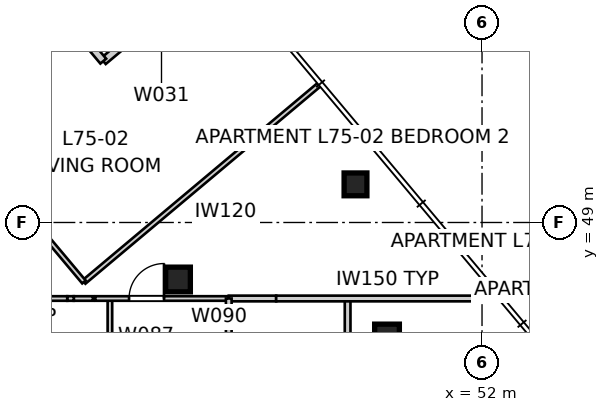
"""IFC4 building model, lengths in metres.
Left out: names, types, materials, properties, quantities, classifications, styles, units other than length and angle.
Written with IfcOpenShell. Run it as: python <this file> out.ifc"""

import sys

from ifc_helpers import new_model, si_unit, direction, frame, frame_2d, origin, origin_2d, place, context, subcontext, project, spatial, rectangle, extrude, element, fill, save


model = new_model("IFC4")
c1 = context("Model", 3, precision=1e-05, world=origin(), true_north=direction((0.0, 1.0)))
c2 = subcontext(c1, "Body", "Model", "MODEL_VIEW")
j1 = project(units=[si_unit("LENGTHUNIT", "METRE"), si_unit("PLANEANGLEUNIT", "RADIAN")], contexts=[c1])
p1 = place(None, origin())
s1 = spatial("IfcSite", under=j1, at=p1, CompositionType="ELEMENT")
p2 = place(p1, origin())
s2 = spatial("IfcBuilding", under=s1, at=p2, CompositionType="ELEMENT")
p3 = place(p2, frame((0.0, 0.0, 272.6)))
s3 = spatial("IfcBuildingStorey", under=s2, at=p3, CompositionType="ELEMENT", Elevation=272.6)
p4 = place(p3, frame((48.671, 50.003, -0.15), z_axis=(0.0, 0.0, 1.0), x_axis=(1.0, 0.0, 0.0)))
e1 = element("IfcColumn", 1, at=p4, inside=s3, PredefinedType="COLUMN", context=c2, shape_type="SweptSolid", body=[
    extrude(rectangle(XDim=0.6, YDim=0.6, at=origin_2d()), origin(), (0.0, 0.0, 1.0), 3.55),
])
for number, where, z_axis, x_axis in (
    (2, (49.5, 46.0, 0.0), (0.0, 0.0, 1.0), (1.0, 0.0, 0.0)),
    (3, (44.0, 47.5, 0.0), (0.0, 0.0, 1.0), (1.0, 0.0, 0.0)),
):
    element("IfcColumn", number, at=place(p3, frame(where, z_axis=z_axis, x_axis=x_axis)), inside=s3, PredefinedType="COLUMN", context=c2, shape_type="SweptSolid", body=[
        extrude(rectangle(XDim=0.65, YDim=0.65, at=origin_2d()), origin(), (0.0, 0.0, 1.0), 3.4),
    ])
p5 = place(p3, frame((45.098, 55.817, 0.0), z_axis=(0.0, 0.0, 1.0), x_axis=(-0.766060656284, -0.642768287094, 0.0)))
e4 = element("IfcWall", 4, at=p5, inside=s3, PredefinedType="SOLIDWALL", context=c2, shape_type="SweptSolid", body=[
    extrude(rectangle(XDim=4.0, YDim=0.2, at=frame_2d((2.0, 0.0))), origin(), (0.0, 0.0, 1.0), 3.25),
])
p6 = place(p5, frame((0.8, 0.0, 0.0)))
e5 = element("IfcOpeningElement", 5, at=p6, cuts=e4, PredefinedType="OPENING", context=c2, shape_type="SweptSolid", body=[
    extrude(rectangle(XDim=2.4, YDim=2.1, at=frame_2d((1.2, 1.05))), frame((0.0, 0.11, 0.0), z_axis=(0.0, -1.0, 0.0), x_axis=(1.0, 0.0, 0.0)), (0.0, 0.0, 1.0), 0.22),
])
p7 = place(p3, frame((42.034, 53.246, 0.0), z_axis=(0.0, 0.0, 1.0), x_axis=(-0.642798342015, 0.766035437498, 0.0)))
e6 = element("IfcWall", 6, at=p7, inside=s3, PredefinedType="SOLIDWALL", context=c2, shape_type="SweptSolid", body=[
    extrude(rectangle(XDim=4.0, YDim=0.2, at=frame_2d((2.0, 0.0))), origin(), (0.0, 0.0, 1.0), 3.25),
])
p8 = place(p7, frame((1.0, 0.0, 0.45)))
e7 = element("IfcOpeningElement", 7, at=p8, cuts=e6, PredefinedType="OPENING", context=c2, shape_type="SweptSolid", body=[
    extrude(rectangle(XDim=2.0, YDim=1.8, at=frame_2d((1.0, 0.9))), frame((0.0, 0.11, 0.0), z_axis=(0.0, -1.0, 0.0), x_axis=(1.0, 0.0, 0.0)), (0.0, 0.0, 1.0), 0.22),
])
p9 = place(p3, frame((42.208, 47.0, 0.0), z_axis=(0.0, 0.0, 1.0), x_axis=(0.0, -1.0, 0.0)))
e8 = element("IfcWall", 8, at=p9, inside=s3, PredefinedType="PARTITIONING", context=c2, shape_type="SweptSolid", body=[
    extrude(rectangle(XDim=4.9, YDim=0.12, at=frame_2d((2.45, 0.0))), origin(), (0.0, 0.0, 1.0), 3.25),
])
p10 = place(p9, frame((1.97, 0.0, 0.0)))
e9 = element("IfcOpeningElement", 9, at=p10, cuts=e8, PredefinedType="OPENING", context=c2, shape_type="SweptSolid", body=[
    extrude(rectangle(XDim=0.96, YDim=2.1, at=frame_2d((0.48, 1.05))), frame((0.0, 0.07, 0.0), z_axis=(0.0, -1.0, 0.0), x_axis=(1.0, 0.0, 0.0)), (0.0, 0.0, 1.0), 0.14),
])
p11 = place(p3, frame((41.258, 47.0, 0.0), z_axis=(0.0, 0.0, 1.0), x_axis=(1.0, 0.0, 0.0)))
e10 = element("IfcWall", 10, at=p11, inside=s3, PredefinedType="PARTITIONING", context=c2, shape_type="SweptSolid", body=[
    extrude(rectangle(XDim=0.504, YDim=0.12, at=frame_2d((0.252, 0.0))), origin(), (0.0, 0.0, 1.0), 3.25),
])
p12 = place(p3, frame((41.824, 47.0, 0.0), z_axis=(0.0, 0.0, 1.0), x_axis=(1.0, 0.0, 0.0)))
e11 = element("IfcWall", 11, at=p12, inside=s3, PredefinedType="PARTITIONING", context=c2, shape_type="SweptSolid", body=[
    extrude(rectangle(XDim=3.511, YDim=0.12, at=frame_2d((1.756, 0.0))), origin(), (0.0, 0.0, 1.0), 3.25),
])
p13 = place(p12, frame((0.887, 0.0, 0.0)))
e12 = element("IfcOpeningElement", 12, at=p13, cuts=e11, PredefinedType="OPENING", context=c2, shape_type="SweptSolid", body=[
    extrude(rectangle(XDim=0.92, YDim=2.34, at=frame_2d((0.46, 1.17))), frame((0.0, 0.07, 0.0), z_axis=(0.0, -1.0, 0.0), x_axis=(1.0, 0.0, 0.0)), (0.0, 0.0, 1.0), 0.14),
])
p14 = place(p3, frame((37.786, 47.0, 0.0), z_axis=(0.0, 0.0, 1.0), x_axis=(1.0, 0.0, 0.0)))
e13 = element("IfcWall", 13, at=p14, inside=s3, PredefinedType="PARTITIONING", context=c2, shape_type="SweptSolid", body=[
    extrude(rectangle(XDim=3.299, YDim=0.12, at=frame_2d((1.65, 0.0))), origin(), (0.0, 0.0, 1.0), 3.25),
])
p15 = place(p3, frame((48.463, 42.1, 0.0), z_axis=(0.0, 0.0, 1.0), x_axis=(0.0, 1.0, 0.0)))
e14 = element("IfcWall", 14, at=p15, inside=s3, PredefinedType="SOLIDWALL", context=c2, shape_type="SweptSolid", body=[
    extrude(rectangle(XDim=4.9, YDim=0.15, at=frame_2d((2.45, 0.0))), origin(), (0.0, 0.0, 1.0), 3.25),
])
p16 = place(p15, frame((1.99, 0.0, 0.0)))
e15 = element("IfcOpeningElement", 15, at=p16, cuts=e14, PredefinedType="OPENING", context=c2, shape_type="SweptSolid", body=[
    extrude(rectangle(XDim=0.92, YDim=2.34, at=frame_2d((0.46, 1.17))), frame((0.0, 0.085, 0.0), z_axis=(0.0, -1.0, 0.0), x_axis=(1.0, 0.0, 0.0)), (0.0, 0.0, 1.0), 0.17),
])
p17 = place(p3, frame((45.336, 47.0, 0.0), z_axis=(0.0, 0.0, 1.0), x_axis=(1.0, 0.0, 0.0)))
e16 = element("IfcWall", 16, at=p17, inside=s3, PredefinedType="SOLIDWALL", context=c2, shape_type="SweptSolid", body=[
    extrude(rectangle(XDim=1.248, YDim=0.15, at=frame_2d((0.624, 0.0))), origin(), (0.0, 0.0, 1.0), 2.55),
])
p18 = place(p3, frame((46.583, 47.0, 0.0), z_axis=(0.0, 0.0, 1.0), x_axis=(1.0, 0.0, 0.0)))
e17 = element("IfcWall", 17, at=p18, inside=s3, PredefinedType="SOLIDWALL", context=c2, shape_type="SweptSolid", body=[
    extrude(rectangle(XDim=5.86, YDim=0.15, at=frame_2d((2.93, 0.0))), origin(), (0.0, 0.0, 1.0), 3.25),
])
p19 = place(p3, frame((45.336, 47.0, 0.0), z_axis=(0.0, 0.0, 1.0), x_axis=(0.0, -1.0, 0.0)))
e18 = element("IfcWall", 18, at=p19, inside=s3, PredefinedType="SOLIDWALL", context=c2, shape_type="SweptSolid", body=[
    extrude(rectangle(XDim=4.9, YDim=0.15, at=frame_2d((2.45, 0.0))), origin(), (0.0, 0.0, 1.0), 3.25),
])
p20 = place(p19, frame((1.99, 0.0, 0.0)))
e19 = element("IfcOpeningElement", 19, at=p20, cuts=e18, PredefinedType="OPENING", context=c2, shape_type="SweptSolid", body=[
    extrude(rectangle(XDim=0.92, YDim=2.34, at=frame_2d((0.46, 1.17))), frame((0.0, 0.085, 0.0), z_axis=(0.0, -1.0, 0.0), x_axis=(1.0, 0.0, 0.0)), (0.0, 0.0, 1.0), 0.17),
])
p21 = place(p3, frame((47.719, 52.631, 0.0), z_axis=(0.0, 0.0, 1.0), x_axis=(-0.766033729027, -0.642800378028, 0.0)))
e20 = element("IfcWall", 20, at=p21, inside=s3, PredefinedType="PARTITIONING", context=c2, shape_type="SweptSolid", body=[
    extrude(rectangle(XDim=8.085, YDim=0.12, at=frame_2d((4.042, 0.0))), origin(), (0.0, 0.0, 1.0), 3.25),
])
p22 = place(p3, frame((41.525, 47.434, 0.0), z_axis=(0.0, 0.0, 1.0), x_axis=(-0.642800378028, 0.766033729027, 0.0)))
e21 = element("IfcWall", 21, at=p22, inside=s3, PredefinedType="PARTITIONING", context=c2, shape_type="SweptSolid", body=[
    extrude(rectangle(XDim=8.085, YDim=0.12, at=frame_2d((4.042, 0.0))), origin(), (0.0, 0.0, 1.0), 3.25),
])
p23 = place(p22, frame((3.603, 0.0, 0.0)))
e22 = element("IfcOpeningElement", 22, at=p23, cuts=e21, PredefinedType="OPENING", context=c2, shape_type="SweptSolid", body=[
    extrude(rectangle(XDim=0.92, YDim=2.34, at=frame_2d((0.46, 1.17))), frame((0.0, 0.07, 0.0), z_axis=(0.0, -1.0, 0.0), x_axis=(1.0, 0.0, 0.0)), (0.0, 0.0, 1.0), 0.14),
])
p24 = place(p3, frame((41.258, 47.0, 0.0), z_axis=(0.0, 0.0, 1.0), x_axis=(-1.0, 0.0, 0.0)))
e23 = element("IfcWall", 23, at=p24, inside=s3, PredefinedType="PARTITIONING", context=c2, shape_type="SweptSolid", body=[
    extrude(rectangle(XDim=0.172, YDim=0.12, at=frame_2d((0.086, 0.0))), origin(), (0.0, 0.0, 1.0), 3.25),
])
p25 = place(p13, origin())
e24 = element("IfcDoor", 24, at=p25, inside=s3, OperationType="SINGLE_SWING_RIGHT", PredefinedType="DOOR", context=c2, shape_type="SweptSolid", body=[
    extrude(rectangle(XDim=0.92, YDim=2.34, at=frame_2d((0.46, 1.17))), frame((0.0, 0.025, 0.0), z_axis=(0.0, -1.0, 0.0), x_axis=(1.0, 0.0, 0.0)), (0.0, 0.0, 1.0), 0.05),
])
fill(e12, e24)
save(model, sys.argv[1])
